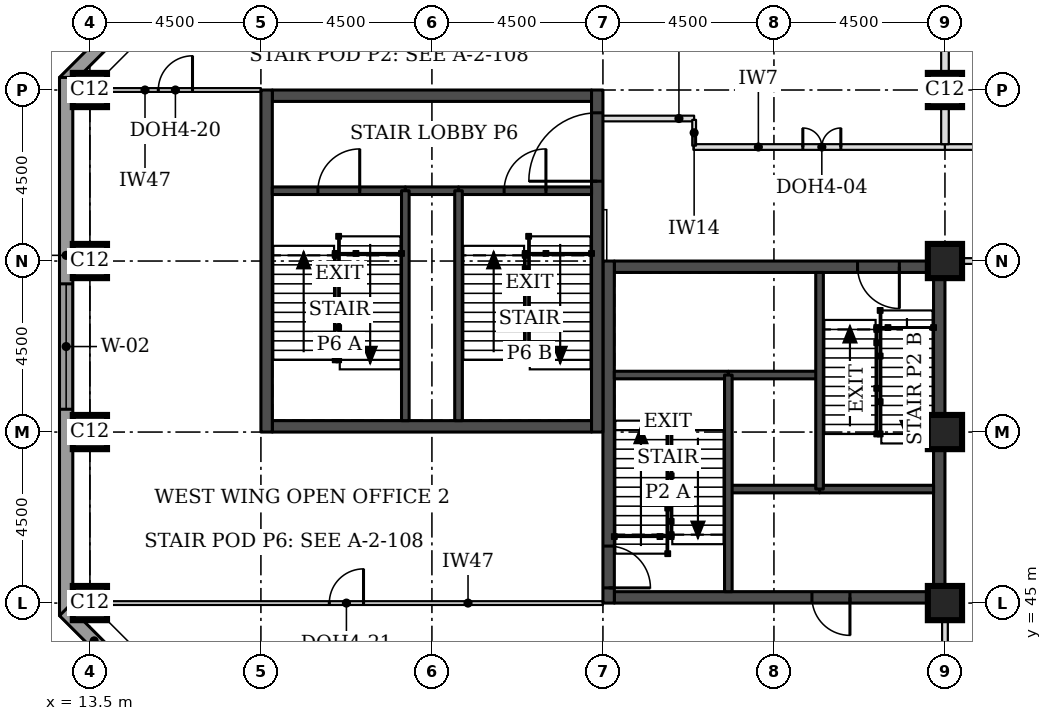
"""IFC4 building model, lengths in metres.
Left out: names, types, materials, properties, quantities, classifications, styles, units other than length and angle.
Written with IfcOpenShell. Run it as: python <this file> out.ifc"""

import sys

from ifc_helpers import new_model, si_unit, direction, frame, frame_2d, origin, origin_2d, place, context, subcontext, project, spatial, rectangle, extrude, element, fill, save


model = new_model("IFC4")
c1 = context("Model", 3, precision=1e-05, world=origin(), true_north=direction((0.0, 1.0)))
c2 = subcontext(c1, "Body", "Model", "MODEL_VIEW")
j1 = project(units=[si_unit("LENGTHUNIT", "METRE"), si_unit("PLANEANGLEUNIT", "RADIAN")], contexts=[c1])
p1 = place(None, origin())
s1 = spatial("IfcSite", under=j1, at=p1, CompositionType="ELEMENT")
p2 = place(p1, origin())
s2 = spatial("IfcBuilding", under=s1, at=p2, CompositionType="ELEMENT")
p3 = place(p2, frame((0.0, 0.0, 169.9)))
s3 = spatial("IfcBuildingStorey", under=s2, at=p3, CompositionType="ELEMENT", Elevation=169.9)
for number, where, z_axis, x_axis in (
    (1, (13.5, 45.0, 0.0), (0.0, 0.0, 1.0), (1.0, 0.0, 0.0)),
    (2, (36.0, 45.0, 0.0), (0.0, 0.0, 1.0), (1.0, 0.0, 0.0)),
    (3, (13.5, 49.5, 0.0), (0.0, 0.0, 1.0), (1.0, 0.0, 0.0)),
    (4, (36.0, 49.5, 0.0), (0.0, 0.0, 1.0), (1.0, 0.0, 0.0)),
    (5, (13.5, 54.0, 0.0), (0.0, 0.0, 1.0), (1.0, 0.0, 0.0)),
    (6, (36.0, 54.0, 0.0), (0.0, 0.0, 1.0), (1.0, 0.0, 0.0)),
    (7, (13.5, 58.5, 0.0), (0.0, 0.0, 1.0), (1.0, 0.0, 0.0)),
    (8, (36.0, 58.5, 0.0), (0.0, 0.0, 1.0), (1.0, 0.0, 0.0)),
):
    element("IfcColumn", number, at=place(p3, frame(where, z_axis=z_axis, x_axis=x_axis)), inside=s3, PredefinedType="COLUMN", context=c2, shape_type="SweptSolid", body=[
        extrude(rectangle(XDim=0.9, YDim=0.9, at=origin_2d()), origin(), (0.0, 0.0, 1.0), 3.7),
    ])
p4 = place(p3, frame((27.3, 45.15, 0.0), z_axis=(0.0, 0.0, 1.0), x_axis=(1.0, 0.0, 0.0)))
e9 = element("IfcWall", 9, at=p4, inside=s3, PredefinedType="SHEAR", context=c2, shape_type="SweptSolid", body=[
    extrude(rectangle(XDim=8.4, YDim=0.3, at=frame_2d((4.2, 0.0))), origin(), (0.0, 0.0, 1.0), 3.7),
])
p5 = place(p4, frame((5.2, 0.0, 0.0)))
e10 = element("IfcOpeningElement", 10, at=p5, cuts=e9, PredefinedType="OPENING", context=c2, shape_type="SweptSolid", body=[
    extrude(rectangle(XDim=1.0, YDim=2.1, at=frame_2d((0.5, 1.05))), frame((0.0, 0.16, 0.0), z_axis=(0.0, -1.0, 0.0), x_axis=(1.0, 0.0, 0.0)), (0.0, 0.0, 1.0), 0.32),
])
p6 = place(p3, frame((27.3, 53.85, 0.0), z_axis=(0.0, 0.0, 1.0), x_axis=(1.0, 0.0, 0.0)))
e11 = element("IfcWall", 11, at=p6, inside=s3, PredefinedType="SHEAR", context=c2, shape_type="SweptSolid", body=[
    extrude(rectangle(XDim=8.4, YDim=0.3, at=frame_2d((4.2, 0.0))), origin(), (0.0, 0.0, 1.0), 3.7),
])
p7 = place(p6, frame((6.4, 0.0, 0.0)))
e12 = element("IfcOpeningElement", 12, at=p7, cuts=e11, PredefinedType="OPENING", context=c2, shape_type="SweptSolid", body=[
    extrude(rectangle(XDim=1.1, YDim=2.1, at=frame_2d((0.55, 1.05))), frame((0.0, 0.16, 0.0), z_axis=(0.0, -1.0, 0.0), x_axis=(1.0, 0.0, 0.0)), (0.0, 0.0, 1.0), 0.32),
])
p8 = place(p3, frame((27.15, 45.0, 0.0), z_axis=(0.0, 0.0, 1.0), x_axis=(0.0, 1.0, 0.0)))
e13 = element("IfcWall", 13, at=p8, inside=s3, PredefinedType="SHEAR", context=c2, shape_type="SweptSolid", body=[
    extrude(rectangle(XDim=9.0, YDim=0.3, at=frame_2d((4.5, 0.0))), origin(), (0.0, 0.0, 1.0), 3.7),
])
p9 = place(p8, frame((0.4, 0.0, 0.0)))
e14 = element("IfcOpeningElement", 14, at=p9, cuts=e13, PredefinedType="OPENING", context=c2, shape_type="SweptSolid", body=[
    extrude(rectangle(XDim=1.1, YDim=2.1, at=frame_2d((0.55, 1.05))), frame((0.0, 0.16, 0.0), z_axis=(0.0, -1.0, 0.0), x_axis=(1.0, 0.0, 0.0)), (0.0, 0.0, 1.0), 0.32),
])
p10 = place(p3, frame((35.85, 45.0, 0.0), z_axis=(0.0, 0.0, 1.0), x_axis=(0.0, 1.0, 0.0)))
e15 = element("IfcWall", 15, at=p10, inside=s3, PredefinedType="SHEAR", context=c2, shape_type="SweptSolid", body=[
    extrude(rectangle(XDim=9.0, YDim=0.3, at=frame_2d((4.5, 0.0))), origin(), (0.0, 0.0, 1.0), 3.7),
])
for number, where, z_axis, x_axis in (
    (16, (18.3, 49.65, 0.0), (0.0, 0.0, 1.0), (1.0, 0.0, 0.0)),
    (17, (18.3, 58.35, 0.0), (0.0, 0.0, 1.0), (1.0, 0.0, 0.0)),
):
    element("IfcWall", number, at=place(p3, frame(where, z_axis=z_axis, x_axis=x_axis)), inside=s3, PredefinedType="SHEAR", context=c2, shape_type="SweptSolid", body=[
        extrude(rectangle(XDim=8.4, YDim=0.3, at=frame_2d((4.2, 0.0))), origin(), (0.0, 0.0, 1.0), 3.7),
    ])
p11 = place(p3, frame((18.15, 49.5, 0.0), z_axis=(0.0, 0.0, 1.0), x_axis=(0.0, 1.0, 0.0)))
e18 = element("IfcWall", 18, at=p11, inside=s3, PredefinedType="SHEAR", context=c2, shape_type="SweptSolid", body=[
    extrude(rectangle(XDim=9.0, YDim=0.3, at=frame_2d((4.5, 0.0))), origin(), (0.0, 0.0, 1.0), 3.7),
])
p12 = place(p3, frame((26.85, 49.5, 0.0), z_axis=(0.0, 0.0, 1.0), x_axis=(0.0, 1.0, 0.0)))
e19 = element("IfcWall", 19, at=p12, inside=s3, PredefinedType="SHEAR", context=c2, shape_type="SweptSolid", body=[
    extrude(rectangle(XDim=9.0, YDim=0.3, at=frame_2d((4.5, 0.0))), origin(), (0.0, 0.0, 1.0), 3.7),
])
p13 = place(p12, frame((6.6, 0.0, 0.0)))
e20 = element("IfcOpeningElement", 20, at=p13, cuts=e19, PredefinedType="OPENING", context=c2, shape_type="SweptSolid", body=[
    extrude(rectangle(XDim=1.8, YDim=2.1, at=frame_2d((0.9, 1.05))), frame((0.0, 0.16, 0.0), z_axis=(0.0, -1.0, 0.0), x_axis=(1.0, 0.0, 0.0)), (0.0, 0.0, 1.0), 0.32),
])
p14 = place(p3, frame((17.792, 63.676, 0.0), z_axis=(0.0, 0.0, 1.0), x_axis=(-0.707106781187, -0.707106781187, 0.0)))
e21 = element("IfcWall", 21, at=p14, inside=s3, PredefinedType="STANDARD", context=c2, shape_type="SweptSolid", body=[
    extrude(rectangle(XDim=7.027, YDim=0.35, at=frame_2d((3.513, 0.0))), origin(), (0.0, 0.0, 1.0), 3.525),
])
p15 = place(p14, frame((1.863, 0.0, 0.9)))
e22 = element("IfcOpeningElement", 22, at=p15, cuts=e21, PredefinedType="OPENING", context=c2, shape_type="SweptSolid", body=[
    extrude(rectangle(XDim=3.3, YDim=1.9, at=frame_2d((1.65, 0.95))), frame((0.0, 0.185, 0.0), z_axis=(0.0, -1.0, 0.0), x_axis=(1.0, 0.0, 0.0)), (0.0, 0.0, 1.0), 0.37),
])
p16 = place(p3, frame((12.875, 58.831, 0.0), z_axis=(0.0, 0.0, 1.0), x_axis=(0.0, -1.0, 0.0)))
e23 = element("IfcWall", 23, at=p16, inside=s3, PredefinedType="STANDARD", context=c2, shape_type="SweptSolid", body=[
    extrude(rectangle(XDim=14.163, YDim=0.35, at=frame_2d((7.081, 0.0))), origin(), (0.0, 0.0, 1.0), 3.525),
])
p17 = place(p16, frame((5.431, 0.0, 0.9)))
e24 = element("IfcOpeningElement", 24, at=p17, cuts=e23, PredefinedType="OPENING", context=c2, shape_type="SweptSolid", body=[
    extrude(rectangle(XDim=3.3, YDim=1.9, at=frame_2d((1.65, 0.95))), frame((0.0, 0.185, 0.0), z_axis=(0.0, -1.0, 0.0), x_axis=(1.0, 0.0, 0.0)), (0.0, 0.0, 1.0), 0.37),
])
p18 = place(p3, frame((12.824, 44.792, 0.0), z_axis=(0.0, 0.0, 1.0), x_axis=(0.707106781187, -0.707106781187, 0.0)))
e25 = element("IfcWall", 25, at=p18, inside=s3, PredefinedType="STANDARD", context=c2, shape_type="SweptSolid", body=[
    extrude(rectangle(XDim=7.027, YDim=0.35, at=frame_2d((3.513, 0.0))), origin(), (0.0, 0.0, 1.0), 3.525),
])
p19 = place(p18, frame((1.863, 0.0, 0.9)))
e26 = element("IfcOpeningElement", 26, at=p19, cuts=e25, PredefinedType="OPENING", context=c2, shape_type="SweptSolid", body=[
    extrude(rectangle(XDim=3.3, YDim=1.9, at=frame_2d((1.65, 0.95))), frame((0.0, 0.185, 0.0), z_axis=(0.0, -1.0, 0.0), x_axis=(1.0, 0.0, 0.0)), (0.0, 0.0, 1.0), 0.37),
])
p20 = place(p3, frame((36.45, 54.0, 0.0), z_axis=(0.0, 0.0, 1.0), x_axis=(1.0, 0.0, 0.0)))
e27 = element("IfcWall", 27, at=p20, inside=s3, PredefinedType="PARTITIONING", context=c2, shape_type="SweptSolid", body=[
    extrude(rectangle(XDim=5.625, YDim=0.15, at=frame_2d((2.812, 0.0))), origin(), (0.0, 0.0, 1.0), 3.55),
])
p21 = place(p3, frame((29.38, 57.0, 0.0), z_axis=(0.0, 0.0, 1.0), x_axis=(1.0, 0.0, 0.0)))
e28 = element("IfcWall", 28, at=p21, inside=s3, PredefinedType="PARTITIONING", context=c2, shape_type="SweptSolid", body=[
    extrude(rectangle(XDim=6.62, YDim=0.15, at=frame_2d((3.31, 0.0))), origin(), (0.0, 0.0, 1.0), 3.55),
])
p22 = place(p21, frame((2.88, 0.0, 0.0)))
e29 = element("IfcOpeningElement", 29, at=p22, cuts=e28, PredefinedType="OPENING", context=c2, shape_type="SweptSolid", body=[
    extrude(rectangle(XDim=1.0, YDim=2.1, at=frame_2d((0.5, 1.05))), frame((0.0, 0.085, 0.0), z_axis=(0.0, -1.0, 0.0), x_axis=(1.0, 0.0, 0.0)), (0.0, 0.0, 1.0), 0.17),
])
p23 = place(p3, frame((36.0, 57.0, 0.0), z_axis=(0.0, 0.0, 1.0), x_axis=(1.0, 0.0, 0.0)))
e30 = element("IfcWall", 30, at=p23, inside=s3, PredefinedType="PARTITIONING", context=c2, shape_type="SweptSolid", body=[
    extrude(rectangle(XDim=6.075, YDim=0.15, at=frame_2d((3.038, 0.0))), origin(), (0.0, 0.0, 1.0), 3.55),
])
p24 = place(p23, frame((2.55, 0.0, 0.0)))
e31 = element("IfcOpeningElement", 31, at=p24, cuts=e30, PredefinedType="OPENING", context=c2, shape_type="SweptSolid", body=[
    extrude(rectangle(XDim=1.0, YDim=2.1, at=frame_2d((0.5, 1.05))), frame((0.0, 0.085, 0.0), z_axis=(0.0, -1.0, 0.0), x_axis=(1.0, 0.0, 0.0)), (0.0, 0.0, 1.0), 0.17),
])
p25 = place(p3, frame((36.0, 40.95, 0.0), z_axis=(0.0, 0.0, 1.0), x_axis=(0.0, 1.0, 0.0)))
e32 = element("IfcWall", 32, at=p25, inside=s3, PredefinedType="PARTITIONING", context=c2, shape_type="SweptSolid", body=[
    extrude(rectangle(XDim=3.63, YDim=0.15, at=frame_2d((1.815, 0.0))), origin(), (0.0, 0.0, 1.0), 2.8),
])
p26 = place(p25, frame((1.4, 0.0, 0.0)))
e33 = element("IfcOpeningElement", 33, at=p26, cuts=e32, PredefinedType="OPENING", context=c2, shape_type="SweptSolid", body=[
    extrude(rectangle(XDim=0.9, YDim=2.1, at=frame_2d((0.45, 1.05))), frame((0.0, 0.085, 0.0), z_axis=(0.0, -1.0, 0.0), x_axis=(1.0, 0.0, 0.0)), (0.0, 0.0, 1.0), 0.17),
])
p27 = place(p3, frame((36.0, 57.075, 0.0), z_axis=(0.0, 0.0, 1.0), x_axis=(0.0, 1.0, 0.0)))
e34 = element("IfcWall", 34, at=p27, inside=s3, PredefinedType="PARTITIONING", context=c2, shape_type="SweptSolid", body=[
    extrude(rectangle(XDim=0.975, YDim=0.2, at=frame_2d((0.488, 0.0))), origin(), (0.0, 0.0, 1.0), 2.8),
])
p28 = place(p3, frame((36.0, 58.92, 0.0), z_axis=(0.0, 0.0, 1.0), x_axis=(0.0, 1.0, 0.0)))
e35 = element("IfcWall", 35, at=p28, inside=s3, PredefinedType="PARTITIONING", context=c2, shape_type="SweptSolid", body=[
    extrude(rectangle(XDim=3.63, YDim=0.2, at=frame_2d((1.815, 0.0))), origin(), (0.0, 0.0, 1.0), 2.8),
])
p29 = place(p3, frame((13.5, 58.5, 0.0), z_axis=(0.0, 0.0, 1.0), x_axis=(1.0, 0.0, 0.0)))
e36 = element("IfcWall", 36, at=p29, inside=s3, PredefinedType="PARTITIONING", context=c2, shape_type="SweptSolid", body=[
    extrude(rectangle(XDim=4.5, YDim=0.1, at=frame_2d((2.25, 0.0))), origin(), (0.0, 0.0, 1.0), 2.55),
])
p30 = place(p29, frame((1.8, 0.0, 0.0)))
e37 = element("IfcOpeningElement", 37, at=p30, cuts=e36, PredefinedType="OPENING", context=c2, shape_type="SweptSolid", body=[
    extrude(rectangle(XDim=0.9, YDim=2.1, at=frame_2d((0.45, 1.05))), frame((0.0, 0.06, 0.0), z_axis=(0.0, -1.0, 0.0), x_axis=(1.0, 0.0, 0.0)), (0.0, 0.0, 1.0), 0.12),
])
p31 = place(p3, frame((27.0, 45.0, 0.0), z_axis=(0.0, 0.0, 1.0), x_axis=(-1.0, 0.0, 0.0)))
e38 = element("IfcWall", 38, at=p31, inside=s3, PredefinedType="PARTITIONING", context=c2, shape_type="SweptSolid", body=[
    extrude(rectangle(XDim=13.5, YDim=0.1, at=frame_2d((6.75, 0.0))), origin(), (0.0, 0.0, 1.0), 2.55),
])
p32 = place(p31, frame((6.3, 0.0, 0.0)))
e39 = element("IfcOpeningElement", 39, at=p32, cuts=e38, PredefinedType="OPENING", context=c2, shape_type="SweptSolid", body=[
    extrude(rectangle(XDim=0.9, YDim=2.1, at=frame_2d((0.45, 1.05))), frame((0.0, 0.06, 0.0), z_axis=(0.0, -1.0, 0.0), x_axis=(1.0, 0.0, 0.0)), (0.0, 0.0, 1.0), 0.12),
])
p33 = place(p3, frame((27.0, 57.75, 0.0), z_axis=(0.0, 0.0, 1.0), x_axis=(1.0, 0.0, 0.0)))
e40 = element("IfcWall", 40, at=p33, inside=s3, PredefinedType="PARTITIONING", context=c2, shape_type="SweptSolid", body=[
    extrude(rectangle(XDim=2.4, YDim=0.15, at=frame_2d((1.2, 0.0))), origin(), (0.0, 0.0, 1.0), 3.55),
])
p34 = place(p3, frame((29.4, 57.715, 0.0), z_axis=(0.0, 0.0, 1.0), x_axis=(0.0, -1.0, 0.0)))
e41 = element("IfcWall", 41, at=p34, inside=s3, PredefinedType="PARTITIONING", context=c2, shape_type="SweptSolid", body=[
    extrude(rectangle(XDim=0.68, YDim=0.1, at=frame_2d((0.34, 0.0))), origin(), (0.0, 0.0, 1.0), 3.55),
])
p35 = place(p3, frame((30.3, 48.0, 0.0), z_axis=(0.0, 0.0, 1.0), x_axis=(1.0, 0.0, 0.0)))
e42 = element("IfcWall", 42, at=p35, inside=s3, PredefinedType="SOLIDWALL", context=c2, shape_type="SweptSolid", body=[
    extrude(rectangle(XDim=2.4, YDim=0.2, at=frame_2d((1.2, 0.0))), origin(), (0.0, 0.0, 1.0), 3.55),
])
p36 = place(p3, frame((32.7, 48.0, 0.0), z_axis=(0.0, 0.0, 1.0), x_axis=(1.0, 0.0, 0.0)))
e43 = element("IfcWall", 43, at=p36, inside=s3, PredefinedType="SOLIDWALL", context=c2, shape_type="SweptSolid", body=[
    extrude(rectangle(XDim=3.0, YDim=0.2, at=frame_2d((1.5, 0.0))), origin(), (0.0, 0.0, 1.0), 3.55),
])
p37 = place(p3, frame((30.3, 51.0, 0.0), z_axis=(0.0, 0.0, 1.0), x_axis=(1.0, 0.0, 0.0)))
e44 = element("IfcWall", 44, at=p37, inside=s3, PredefinedType="SOLIDWALL", context=c2, shape_type="SweptSolid", body=[
    extrude(rectangle(XDim=2.4, YDim=0.2, at=frame_2d((1.2, 0.0))), origin(), (0.0, 0.0, 1.0), 3.7),
])
p38 = place(p3, frame((27.3, 51.0, 0.0), z_axis=(0.0, 0.0, 1.0), x_axis=(1.0, 0.0, 0.0)))
e45 = element("IfcWall", 45, at=p38, inside=s3, PredefinedType="SOLIDWALL", context=c2, shape_type="SweptSolid", body=[
    extrude(rectangle(XDim=3.0, YDim=0.2, at=frame_2d((1.5, 0.0))), origin(), (0.0, 0.0, 1.0), 3.55),
])
for number, where, z_axis, x_axis in (
    (46, (30.3, 45.3, 0.0), (0.0, 0.0, 1.0), (0.0, 1.0, 0.0)),
    (47, (32.7, 48.0, 0.0), (0.0, 0.0, 1.0), (0.0, 1.0, 0.0)),
):
    element("IfcWall", number, at=place(p3, frame(where, z_axis=z_axis, x_axis=x_axis)), inside=s3, PredefinedType="SOLIDWALL", context=c2, shape_type="SweptSolid", body=[
        extrude(rectangle(XDim=5.7, YDim=0.2, at=frame_2d((2.85, 0.0))), origin(), (0.0, 0.0, 1.0), 3.55),
    ])
p39 = place(p3, frame((21.8, 55.85, 0.0), z_axis=(0.0, 0.0, 1.0), x_axis=(1.0, 0.0, 0.0)))
e48 = element("IfcWall", 48, at=p39, inside=s3, PredefinedType="SOLIDWALL", context=c2, shape_type="SweptSolid", body=[
    extrude(rectangle(XDim=1.4, YDim=0.2, at=frame_2d((0.7, 0.0))), origin(), (0.0, 0.0, 1.0), 3.55),
])
p40 = place(p3, frame((18.3, 55.85, 0.0), z_axis=(0.0, 0.0, 1.0), x_axis=(1.0, 0.0, 0.0)))
e49 = element("IfcWall", 49, at=p40, inside=s3, PredefinedType="SOLIDWALL", context=c2, shape_type="SweptSolid", body=[
    extrude(rectangle(XDim=3.5, YDim=0.2, at=frame_2d((1.75, 0.0))), origin(), (0.0, 0.0, 1.0), 3.55),
])
p41 = place(p40, frame((1.2, 0.0, 0.0)))
e50 = element("IfcOpeningElement", 50, at=p41, cuts=e49, PredefinedType="OPENING", context=c2, shape_type="SweptSolid", body=[
    extrude(rectangle(XDim=1.1, YDim=2.1, at=frame_2d((0.55, 1.05))), frame((0.0, 0.11, 0.0), z_axis=(0.0, -1.0, 0.0), x_axis=(1.0, 0.0, 0.0)), (0.0, 0.0, 1.0), 0.22),
])
p42 = place(p3, frame((23.2, 55.85, 0.0), z_axis=(0.0, 0.0, 1.0), x_axis=(1.0, 0.0, 0.0)))
e51 = element("IfcWall", 51, at=p42, inside=s3, PredefinedType="SOLIDWALL", context=c2, shape_type="SweptSolid", body=[
    extrude(rectangle(XDim=3.5, YDim=0.2, at=frame_2d((1.75, 0.0))), origin(), (0.0, 0.0, 1.0), 3.55),
])
p43 = place(p42, frame((1.2, 0.0, 0.0)))
e52 = element("IfcOpeningElement", 52, at=p43, cuts=e51, PredefinedType="OPENING", context=c2, shape_type="SweptSolid", body=[
    extrude(rectangle(XDim=1.1, YDim=2.1, at=frame_2d((0.55, 1.05))), frame((0.0, 0.11, 0.0), z_axis=(0.0, -1.0, 0.0), x_axis=(1.0, 0.0, 0.0)), (0.0, 0.0, 1.0), 0.22),
])
for number, where, z_axis, x_axis in (
    (53, (21.8, 49.8, 0.0), (0.0, 0.0, 1.0), (0.0, 1.0, 0.0)),
    (54, (23.2, 49.8, 0.0), (0.0, 0.0, 1.0), (0.0, 1.0, 0.0)),
):
    element("IfcWall", number, at=place(p3, frame(where, z_axis=z_axis, x_axis=x_axis)), inside=s3, PredefinedType="SOLIDWALL", context=c2, shape_type="SweptSolid", body=[
        extrude(rectangle(XDim=6.05, YDim=0.2, at=frame_2d((3.025, 0.0))), origin(), (0.0, 0.0, 1.0), 3.55),
    ])
p44 = place(p17, origin())
e55 = element("IfcWindow", 55, at=p44, inside=s3, PartitioningType="SINGLE_PANEL", PredefinedType="WINDOW", context=c2, shape_type="SweptSolid", body=[
    extrude(rectangle(XDim=3.3, YDim=1.9, at=frame_2d((1.65, 0.95))), frame((0.0, 0.085, 0.0), z_axis=(0.0, -1.0, 0.0), x_axis=(1.0, 0.0, 0.0)), (0.0, 0.0, 1.0), 0.06),
])
fill(e24, e55)
p45 = place(p22, origin())
e56 = element("IfcDoor", 56, at=p45, inside=s3, OperationType="DOUBLE_DOOR_SINGLE_SWING", PredefinedType="DOOR", context=c2, shape_type="SweptSolid", body=[
    extrude(rectangle(XDim=1.0, YDim=2.1, at=frame_2d((0.5, 1.05))), frame((0.0, 0.025, 0.0), z_axis=(0.0, -1.0, 0.0), x_axis=(1.0, 0.0, 0.0)), (0.0, 0.0, 1.0), 0.05),
])
fill(e29, e56)
p46 = place(p30, origin())
e57 = element("IfcDoor", 57, at=p46, inside=s3, OperationType="SINGLE_SWING_RIGHT", PredefinedType="DOOR", context=c2, shape_type="SweptSolid", body=[
    extrude(rectangle(XDim=0.9, YDim=2.1, at=frame_2d((0.45, 1.05))), frame((0.0, 0.025, 0.0), z_axis=(0.0, -1.0, 0.0), x_axis=(1.0, 0.0, 0.0)), (0.0, 0.0, 1.0), 0.05),
])
fill(e37, e57)
p47 = place(p32, frame((0.9, 0.0, 0.0), z_axis=(0.0, 0.0, 1.0), x_axis=(-1.0, 0.0, 0.0)))
e58 = element("IfcDoor", 58, at=p47, inside=s3, OperationType="SINGLE_SWING_RIGHT", PredefinedType="DOOR", context=c2, shape_type="SweptSolid", body=[
    extrude(rectangle(XDim=0.9, YDim=2.1, at=frame_2d((0.45, 1.05))), frame((0.0, 0.025, 0.0), z_axis=(0.0, -1.0, 0.0), x_axis=(1.0, 0.0, 0.0)), (0.0, 0.0, 1.0), 0.05),
])
fill(e39, e58)
p48 = place(p9, frame((1.1, 0.0, 0.0), z_axis=(0.0, 0.0, 1.0), x_axis=(-1.0, 0.0, 0.0)))
e59 = element("IfcDoor", 59, at=p48, inside=s3, OperationType="SINGLE_SWING_RIGHT", PredefinedType="DOOR", context=c2, shape_type="SweptSolid", body=[
    extrude(rectangle(XDim=1.1, YDim=2.1, at=frame_2d((0.55, 1.05))), frame((0.0, 0.025, 0.0), z_axis=(0.0, -1.0, 0.0), x_axis=(1.0, 0.0, 0.0)), (0.0, 0.0, 1.0), 0.05),
])
fill(e14, e59)
p49 = place(p7, frame((1.1, 0.0, 0.0), z_axis=(0.0, 0.0, 1.0), x_axis=(-1.0, 0.0, 0.0)))
e60 = element("IfcDoor", 60, at=p49, inside=s3, OperationType="SINGLE_SWING_LEFT", PredefinedType="DOOR", context=c2, shape_type="SweptSolid", body=[
    extrude(rectangle(XDim=1.1, YDim=2.1, at=frame_2d((0.55, 1.05))), frame((0.0, 0.025, 0.0), z_axis=(0.0, -1.0, 0.0), x_axis=(1.0, 0.0, 0.0)), (0.0, 0.0, 1.0), 0.05),
])
fill(e12, e60)
p50 = place(p5, frame((1.0, 0.0, 0.0), z_axis=(0.0, 0.0, 1.0), x_axis=(-1.0, 0.0, 0.0)))
e61 = element("IfcDoor", 61, at=p50, inside=s3, OperationType="SINGLE_SWING_LEFT", PredefinedType="DOOR", context=c2, shape_type="SweptSolid", body=[
    extrude(rectangle(XDim=1.0, YDim=2.1, at=frame_2d((0.5, 1.05))), frame((0.0, 0.025, 0.0), z_axis=(0.0, -1.0, 0.0), x_axis=(1.0, 0.0, 0.0)), (0.0, 0.0, 1.0), 0.05),
])
fill(e10, e61)
p51 = place(p41, origin())
e62 = element("IfcDoor", 62, at=p51, inside=s3, OperationType="SINGLE_SWING_RIGHT", PredefinedType="DOOR", context=c2, shape_type="SweptSolid", body=[
    extrude(rectangle(XDim=1.1, YDim=2.1, at=frame_2d((0.55, 1.05))), frame((0.0, 0.025, 0.0), z_axis=(0.0, -1.0, 0.0), x_axis=(1.0, 0.0, 0.0)), (0.0, 0.0, 1.0), 0.05),
])
fill(e50, e62)
p52 = place(p43, origin())
e63 = element("IfcDoor", 63, at=p52, inside=s3, OperationType="SINGLE_SWING_RIGHT", PredefinedType="DOOR", context=c2, shape_type="SweptSolid", body=[
    extrude(rectangle(XDim=1.1, YDim=2.1, at=frame_2d((0.55, 1.05))), frame((0.0, 0.025, 0.0), z_axis=(0.0, -1.0, 0.0), x_axis=(1.0, 0.0, 0.0)), (0.0, 0.0, 1.0), 0.05),
])
fill(e52, e63)
p53 = place(p13, origin())
e64 = element("IfcDoor", 64, at=p53, inside=s3, OperationType="SINGLE_SWING_LEFT", PredefinedType="DOOR", context=c2, shape_type="SweptSolid", body=[
    extrude(rectangle(XDim=1.8, YDim=2.1, at=frame_2d((0.9, 1.05))), frame((0.0, 0.025, 0.0), z_axis=(0.0, -1.0, 0.0), x_axis=(1.0, 0.0, 0.0)), (0.0, 0.0, 1.0), 0.05),
])
fill(e20, e64)
save(model, sys.argv[1])
